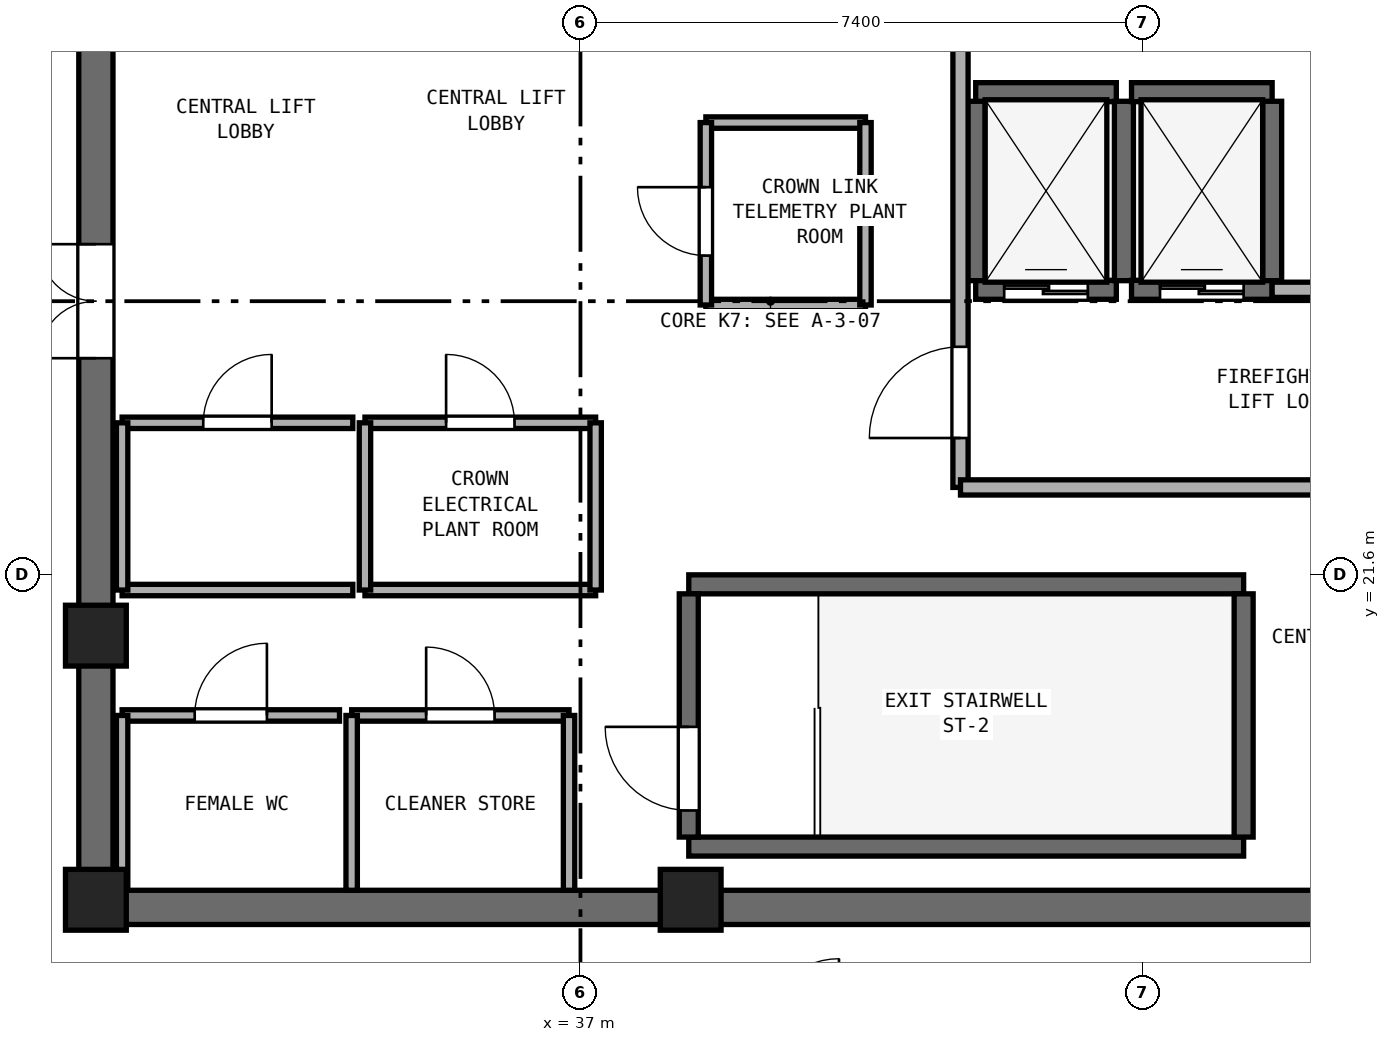
"""IFC4 building model, lengths in metres.
Left out: names, types, materials, properties, quantities, classifications, styles, units other than length and angle.
Written with IfcOpenShell. Run it as: python <this file> out.ifc"""

import sys

from ifc_helpers import new_model, si_unit, direction, frame, frame_2d, origin, origin_2d, place, context, subcontext, project, spatial, rectangle, extrude, element, fill, save


model = new_model("IFC4")
c1 = context("Model", 3, precision=1e-05, world=origin(), true_north=direction((0.0, 1.0)))
c2 = subcontext(c1, "Body", "Model", "MODEL_VIEW")
j1 = project(units=[si_unit("LENGTHUNIT", "METRE"), si_unit("PLANEANGLEUNIT", "RADIAN")], contexts=[c1])
p1 = place(None, origin())
s1 = spatial("IfcSite", under=j1, at=p1, CompositionType="ELEMENT")
p2 = place(p1, origin())
s2 = spatial("IfcBuilding", under=s1, at=p2, CompositionType="ELEMENT")
p3 = place(p2, frame((0.0, 0.0, 333.4)))
s3 = spatial("IfcBuildingStorey", under=s2, at=p3, CompositionType="ELEMENT", Elevation=333.4)
p4 = place(p3, frame((30.4, 17.225, 0.0), z_axis=(0.0, 0.0, 1.0), x_axis=(1.0, 0.0, 0.0)))
e1 = element("IfcWall", 1, at=p4, inside=s3, PredefinedType="SHEAR", context=c2, shape_type="SweptSolid", body=[
    extrude(rectangle(XDim=18.2, YDim=0.45, at=frame_2d((9.1, 0.0))), origin(), (0.0, 0.0, 1.0), 3.7),
])
p5 = place(p3, frame((30.625, 17.45, 0.0), z_axis=(0.0, 0.0, 1.0), x_axis=(0.0, 1.0, 0.0)))
e2 = element("IfcWall", 2, at=p5, inside=s3, PredefinedType="SHEAR", context=c2, shape_type="SweptSolid", body=[
    extrude(rectangle(XDim=15.5, YDim=0.45, at=frame_2d((7.75, 0.0))), origin(), (0.0, 0.0, 1.0), 3.7),
])
p6 = place(p5, frame((7.0, 0.0, 0.0)))
e3 = element("IfcOpeningElement", 3, at=p6, cuts=e2, PredefinedType="OPENING", context=c2, shape_type="SweptSolid", body=[
    extrude(rectangle(XDim=1.5, YDim=2.15, at=frame_2d((0.75, 1.075))), frame((0.0, 0.235, 0.0), z_axis=(0.0, -1.0, 0.0), x_axis=(1.0, 0.0, 0.0)), (0.0, 0.0, 1.0), 0.47),
])
for number, where, z_axis, x_axis in (
    (4, (30.625, 17.325, 0.0), (0.0, 0.0, 1.0), (1.0, 0.0, 0.0)),
    (5, (38.45, 17.325, 0.0), (0.0, 0.0, 1.0), (1.0, 0.0, 0.0)),
    (6, (30.625, 20.8, 0.0), (0.0, 0.0, 1.0), (1.0, 0.0, 0.0)),
):
    element("IfcColumn", number, at=place(p3, frame(where, z_axis=z_axis, x_axis=x_axis)), inside=s3, PredefinedType="PILASTER", context=c2, shape_type="SweptSolid", body=[
        extrude(rectangle(XDim=0.8, YDim=0.8, at=origin_2d()), origin(), (0.0, 0.0, 1.0), 4.0),
    ])
for number, where, z_axis, x_axis in (
    (7, (38.425, 18.025, 0.0), (0.0, 0.0, 1.0), (1.0, 0.0, 0.0)),
    (8, (38.425, 21.475, 0.0), (0.0, 0.0, 1.0), (1.0, 0.0, 0.0)),
):
    element("IfcWall", number, at=place(p3, frame(where, z_axis=z_axis, x_axis=x_axis)), inside=s3, PredefinedType="SHEAR", context=c2, shape_type="SweptSolid", body=[
        extrude(rectangle(XDim=7.3, YDim=0.25, at=frame_2d((3.65, 0.0))), origin(), (0.0, 0.0, 1.0), 3.7),
    ])
p7 = place(p3, frame((38.425, 18.15, 0.0), z_axis=(0.0, 0.0, 1.0), x_axis=(0.0, 1.0, 0.0)))
e9 = element("IfcWall", 9, at=p7, inside=s3, PredefinedType="SHEAR", context=c2, shape_type="SweptSolid", body=[
    extrude(rectangle(XDim=3.2, YDim=0.25, at=frame_2d((1.6, 0.0))), origin(), (0.0, 0.0, 1.0), 3.7),
])
p8 = place(p7, frame((0.35, 0.0, 0.0)))
e10 = element("IfcOpeningElement", 10, at=p8, cuts=e9, PredefinedType="OPENING", context=c2, shape_type="SweptSolid", body=[
    extrude(rectangle(XDim=1.1, YDim=2.15, at=frame_2d((0.55, 1.075))), frame((0.0, 0.135, 0.0), z_axis=(0.0, -1.0, 0.0), x_axis=(1.0, 0.0, 0.0)), (0.0, 0.0, 1.0), 0.27),
])
p9 = place(p3, frame((45.725, 18.15, 0.0), z_axis=(0.0, 0.0, 1.0), x_axis=(0.0, 1.0, 0.0)))
e11 = element("IfcWall", 11, at=p9, inside=s3, PredefinedType="SHEAR", context=c2, shape_type="SweptSolid", body=[
    extrude(rectangle(XDim=3.2, YDim=0.25, at=frame_2d((1.6, 0.0))), origin(), (0.0, 0.0, 1.0), 3.7),
])
p10 = place(p3, frame((42.2, 25.35, 0.0), z_axis=(0.0, 0.0, 1.0), x_axis=(1.0, 0.0, 0.0)))
e12 = element("IfcWall", 12, at=p10, inside=s3, PredefinedType="SHEAR", context=c2, shape_type="SweptSolid", body=[
    extrude(rectangle(XDim=1.85, YDim=0.25, at=frame_2d((0.925, 0.0))), origin(), (0.0, 0.0, 1.0), 3.7),
])
p11 = place(p10, frame((0.375, 0.0, 0.0)))
e13 = element("IfcOpeningElement", 13, at=p11, cuts=e12, PredefinedType="OPENING", context=c2, shape_type="SweptSolid", body=[
    extrude(rectangle(XDim=1.1, YDim=2.15, at=frame_2d((0.55, 1.075))), frame((0.0, 0.135, 0.0), z_axis=(0.0, -1.0, 0.0), x_axis=(1.0, 0.0, 0.0)), (0.0, 0.0, 1.0), 0.27),
])
p12 = place(p3, frame((42.2, 27.95, 0.0), z_axis=(0.0, 0.0, 1.0), x_axis=(1.0, 0.0, 0.0)))
e14 = element("IfcWall", 14, at=p12, inside=s3, PredefinedType="SHEAR", context=c2, shape_type="SweptSolid", body=[
    extrude(rectangle(XDim=1.85, YDim=0.25, at=frame_2d((0.925, 0.0))), origin(), (0.0, 0.0, 1.0), 3.7),
])
for number, where, z_axis, x_axis in (
    (15, (42.2, 25.47, 0.0), (0.0, 0.0, 1.0), (0.0, 1.0, 0.0)),
    (16, (44.15, 25.47, 0.0), (0.0, 0.0, 1.0), (0.0, 1.0, 0.0)),
):
    element("IfcWall", number, at=place(p3, frame(where, z_axis=z_axis, x_axis=x_axis)), inside=s3, PredefinedType="SHEAR", context=c2, shape_type="SweptSolid", body=[
        extrude(rectangle(XDim=2.36, YDim=0.25, at=frame_2d((1.18, 0.0))), origin(), (0.0, 0.0, 1.0), 3.7),
    ])
p13 = place(p3, frame((44.25, 25.35, 0.0), z_axis=(0.0, 0.0, 1.0), x_axis=(1.0, 0.0, 0.0)))
e17 = element("IfcWall", 17, at=p13, inside=s3, PredefinedType="SHEAR", context=c2, shape_type="SweptSolid", body=[
    extrude(rectangle(XDim=1.85, YDim=0.25, at=frame_2d((0.925, 0.0))), origin(), (0.0, 0.0, 1.0), 3.7),
])
p14 = place(p13, frame((0.375, 0.0, 0.0)))
e18 = element("IfcOpeningElement", 18, at=p14, cuts=e17, PredefinedType="OPENING", context=c2, shape_type="SweptSolid", body=[
    extrude(rectangle(XDim=1.1, YDim=2.15, at=frame_2d((0.55, 1.075))), frame((0.0, 0.135, 0.0), z_axis=(0.0, -1.0, 0.0), x_axis=(1.0, 0.0, 0.0)), (0.0, 0.0, 1.0), 0.27),
])
p15 = place(p3, frame((44.25, 27.95, 0.0), z_axis=(0.0, 0.0, 1.0), x_axis=(1.0, 0.0, 0.0)))
e19 = element("IfcWall", 19, at=p15, inside=s3, PredefinedType="SHEAR", context=c2, shape_type="SweptSolid", body=[
    extrude(rectangle(XDim=1.85, YDim=0.25, at=frame_2d((0.925, 0.0))), origin(), (0.0, 0.0, 1.0), 3.7),
])
p16 = place(p3, frame((46.1, 25.47, 0.0), z_axis=(0.0, 0.0, 1.0), x_axis=(0.0, 1.0, 0.0)))
e20 = element("IfcWall", 20, at=p16, inside=s3, PredefinedType="SHEAR", context=c2, shape_type="SweptSolid", body=[
    extrude(rectangle(XDim=2.36, YDim=0.25, at=frame_2d((1.18, 0.0))), origin(), (0.0, 0.0, 1.0), 3.7),
])
p17 = place(p3, frame((42.0, 22.75, 0.0), z_axis=(0.0, 0.0, 1.0), x_axis=(0.0, 1.0, 0.0)))
e21 = element("IfcWall", 21, at=p17, inside=s3, PredefinedType="SOLIDWALL", context=c2, shape_type="SweptSolid", body=[
    extrude(rectangle(XDim=6.05, YDim=0.2, at=frame_2d((3.025, 0.0))), origin(), (0.0, 0.0, 1.0), 3.7),
])
p18 = place(p17, frame((0.65, 0.0, 0.0)))
e22 = element("IfcOpeningElement", 22, at=p18, cuts=e21, PredefinedType="OPENING", context=c2, shape_type="SweptSolid", body=[
    extrude(rectangle(XDim=1.2, YDim=2.15, at=frame_2d((0.6, 1.075))), frame((0.0, 0.11, 0.0), z_axis=(0.0, -1.0, 0.0), x_axis=(1.0, 0.0, 0.0)), (0.0, 0.0, 1.0), 0.22),
])
p19 = place(p3, frame((42.0, 22.75, 0.0), z_axis=(0.0, 0.0, 1.0), x_axis=(1.0, 0.0, 0.0)))
e23 = element("IfcWall", 23, at=p19, inside=s3, PredefinedType="SOLIDWALL", context=c2, shape_type="SweptSolid", body=[
    extrude(rectangle(XDim=6.15, YDim=0.2, at=frame_2d((3.075, 0.0))), origin(), (0.0, 0.0, 1.0), 3.7),
])
p20 = place(p3, frame((46.1, 25.35, 0.0), z_axis=(0.0, 0.0, 1.0), x_axis=(1.0, 0.0, 0.0)))
e24 = element("IfcWall", 24, at=p20, inside=s3, PredefinedType="SOLIDWALL", context=c2, shape_type="SweptSolid", body=[
    extrude(rectangle(XDim=2.05, YDim=0.2, at=frame_2d((1.025, 0.0))), origin(), (0.0, 0.0, 1.0), 3.7),
])
p21 = place(p3, frame((30.97, 19.75, 0.0), z_axis=(0.0, 0.0, 1.0), x_axis=(1.0, 0.0, 0.0)))
e25 = element("IfcWall", 25, at=p21, inside=s3, PredefinedType="PARTITIONING", context=c2, shape_type="SweptSolid", body=[
    extrude(rectangle(XDim=2.86, YDim=0.15, at=frame_2d((1.43, 0.0))), origin(), (0.0, 0.0, 1.0), 3.7),
])
p22 = place(p21, frame((0.955, 0.0, 0.0)))
e26 = element("IfcOpeningElement", 26, at=p22, cuts=e25, PredefinedType="OPENING", context=c2, shape_type="SweptSolid", body=[
    extrude(rectangle(XDim=0.95, YDim=2.1, at=frame_2d((0.475, 1.05))), frame((0.0, 0.085, 0.0), z_axis=(0.0, -1.0, 0.0), x_axis=(1.0, 0.0, 0.0)), (0.0, 0.0, 1.0), 0.17),
])
p23 = place(p3, frame((30.97, 17.45, 0.0), z_axis=(0.0, 0.0, 1.0), x_axis=(0.0, 1.0, 0.0)))
e27 = element("IfcWall", 27, at=p23, inside=s3, PredefinedType="PARTITIONING", context=c2, shape_type="SweptSolid", body=[
    extrude(rectangle(XDim=2.3, YDim=0.15, at=frame_2d((1.15, 0.0))), origin(), (0.0, 0.0, 1.0), 2.8),
])
p24 = place(p3, frame((33.99, 19.75, 0.0), z_axis=(0.0, 0.0, 1.0), x_axis=(1.0, 0.0, 0.0)))
e28 = element("IfcWall", 28, at=p24, inside=s3, PredefinedType="PARTITIONING", context=c2, shape_type="SweptSolid", body=[
    extrude(rectangle(XDim=2.86, YDim=0.15, at=frame_2d((1.43, 0.0))), origin(), (0.0, 0.0, 1.0), 3.7),
])
p25 = place(p24, frame((0.98, 0.0, 0.0)))
e29 = element("IfcOpeningElement", 29, at=p25, cuts=e28, PredefinedType="OPENING", context=c2, shape_type="SweptSolid", body=[
    extrude(rectangle(XDim=0.9, YDim=2.1, at=frame_2d((0.45, 1.05))), frame((0.0, 0.085, 0.0), z_axis=(0.0, -1.0, 0.0), x_axis=(1.0, 0.0, 0.0)), (0.0, 0.0, 1.0), 0.17),
])
for number, where, z_axis, x_axis in (
    (30, (33.99, 17.45, 0.0), (0.0, 0.0, 1.0), (0.0, 1.0, 0.0)),
    (31, (36.85, 17.45, 0.0), (0.0, 0.0, 1.0), (0.0, 1.0, 0.0)),
):
    element("IfcWall", number, at=place(p3, frame(where, z_axis=z_axis, x_axis=x_axis)), inside=s3, PredefinedType="PARTITIONING", context=c2, shape_type="SweptSolid", body=[
        extrude(rectangle(XDim=2.3, YDim=0.15, at=frame_2d((1.15, 0.0))), origin(), (0.0, 0.0, 1.0), 3.7),
    ])
p26 = place(p3, frame((30.97, 21.4, 0.0), z_axis=(0.0, 0.0, 1.0), x_axis=(1.0, 0.0, 0.0)))
e32 = element("IfcWall", 32, at=p26, inside=s3, PredefinedType="PARTITIONING", context=c2, shape_type="SweptSolid", body=[
    extrude(rectangle(XDim=3.035, YDim=0.15, at=frame_2d((1.518, 0.0))), origin(), (0.0, 0.0, 1.0), 3.7),
])
p27 = place(p3, frame((30.97, 23.6, 0.0), z_axis=(0.0, 0.0, 1.0), x_axis=(1.0, 0.0, 0.0)))
e33 = element("IfcWall", 33, at=p27, inside=s3, PredefinedType="PARTITIONING", context=c2, shape_type="SweptSolid", body=[
    extrude(rectangle(XDim=3.035, YDim=0.15, at=frame_2d((1.518, 0.0))), origin(), (0.0, 0.0, 1.0), 3.7),
])
p28 = place(p27, frame((1.067, 0.0, 0.0)))
e34 = element("IfcOpeningElement", 34, at=p28, cuts=e33, PredefinedType="OPENING", context=c2, shape_type="SweptSolid", body=[
    extrude(rectangle(XDim=0.9, YDim=2.1, at=frame_2d((0.45, 1.05))), frame((0.0, 0.085, 0.0), z_axis=(0.0, -1.0, 0.0), x_axis=(1.0, 0.0, 0.0)), (0.0, 0.0, 1.0), 0.17),
])
p29 = place(p3, frame((30.97, 21.4, 0.0), z_axis=(0.0, 0.0, 1.0), x_axis=(0.0, 1.0, 0.0)))
e35 = element("IfcWall", 35, at=p29, inside=s3, PredefinedType="PARTITIONING", context=c2, shape_type="SweptSolid", body=[
    extrude(rectangle(XDim=2.2, YDim=0.15, at=frame_2d((1.1, 0.0))), origin(), (0.0, 0.0, 1.0), 2.8),
])
p30 = place(p3, frame((34.165, 21.4, 0.0), z_axis=(0.0, 0.0, 1.0), x_axis=(1.0, 0.0, 0.0)))
e36 = element("IfcWall", 36, at=p30, inside=s3, PredefinedType="PARTITIONING", context=c2, shape_type="SweptSolid", body=[
    extrude(rectangle(XDim=3.035, YDim=0.15, at=frame_2d((1.518, 0.0))), origin(), (0.0, 0.0, 1.0), 3.7),
])
p31 = place(p3, frame((34.165, 23.6, 0.0), z_axis=(0.0, 0.0, 1.0), x_axis=(1.0, 0.0, 0.0)))
e37 = element("IfcWall", 37, at=p31, inside=s3, PredefinedType="PARTITIONING", context=c2, shape_type="SweptSolid", body=[
    extrude(rectangle(XDim=3.035, YDim=0.15, at=frame_2d((1.518, 0.0))), origin(), (0.0, 0.0, 1.0), 3.7),
])
p32 = place(p31, frame((1.067, 0.0, 0.0)))
e38 = element("IfcOpeningElement", 38, at=p32, cuts=e37, PredefinedType="OPENING", context=c2, shape_type="SweptSolid", body=[
    extrude(rectangle(XDim=0.9, YDim=2.1, at=frame_2d((0.45, 1.05))), frame((0.0, 0.085, 0.0), z_axis=(0.0, -1.0, 0.0), x_axis=(1.0, 0.0, 0.0)), (0.0, 0.0, 1.0), 0.17),
])
for number, where, z_axis, x_axis in (
    (39, (34.165, 21.4, 0.0), (0.0, 0.0, 1.0), (0.0, 1.0, 0.0)),
    (40, (37.2, 21.4, 0.0), (0.0, 0.0, 1.0), (0.0, 1.0, 0.0)),
):
    element("IfcWall", number, at=place(p3, frame(where, z_axis=z_axis, x_axis=x_axis)), inside=s3, PredefinedType="PARTITIONING", context=c2, shape_type="SweptSolid", body=[
        extrude(rectangle(XDim=2.2, YDim=0.15, at=frame_2d((1.1, 0.0))), origin(), (0.0, 0.0, 1.0), 3.7),
    ])
for number, where, z_axis, x_axis in (
    (41, (38.65, 25.15, 0.0), (0.0, 0.0, 1.0), (1.0, 0.0, 0.0)),
    (42, (38.65, 27.55, 0.0), (0.0, 0.0, 1.0), (1.0, 0.0, 0.0)),
):
    element("IfcWall", number, at=place(p3, frame(where, z_axis=z_axis, x_axis=x_axis)), inside=s3, PredefinedType="PARTITIONING", context=c2, shape_type="SweptSolid", body=[
        extrude(rectangle(XDim=2.1, YDim=0.15, at=frame_2d((1.05, 0.0))), origin(), (0.0, 0.0, 1.0), 3.7),
    ])
p33 = place(p3, frame((38.65, 25.15, 0.0), z_axis=(0.0, 0.0, 1.0), x_axis=(0.0, 1.0, 0.0)))
e43 = element("IfcWall", 43, at=p33, inside=s3, PredefinedType="PARTITIONING", context=c2, shape_type="SweptSolid", body=[
    extrude(rectangle(XDim=2.4, YDim=0.15, at=frame_2d((1.2, 0.0))), origin(), (0.0, 0.0, 1.0), 3.7),
])
p34 = place(p33, frame((0.65, 0.0, 0.0)))
e44 = element("IfcOpeningElement", 44, at=p34, cuts=e43, PredefinedType="OPENING", context=c2, shape_type="SweptSolid", body=[
    extrude(rectangle(XDim=0.9, YDim=2.1, at=frame_2d((0.45, 1.05))), frame((0.0, 0.085, 0.0), z_axis=(0.0, -1.0, 0.0), x_axis=(1.0, 0.0, 0.0)), (0.0, 0.0, 1.0), 0.17),
])
p35 = place(p3, frame((40.75, 25.15, 0.0), z_axis=(0.0, 0.0, 1.0), x_axis=(0.0, 1.0, 0.0)))
e45 = element("IfcWall", 45, at=p35, inside=s3, PredefinedType="PARTITIONING", context=c2, shape_type="SweptSolid", body=[
    extrude(rectangle(XDim=2.4, YDim=0.15, at=frame_2d((1.2, 0.0))), origin(), (0.0, 0.0, 1.0), 3.7),
])
p36 = place(p3, frame((27.114, 17.109, 0.0), z_axis=(0.0, 0.0, 1.0), x_axis=(0.751684867815, -0.659522448062, 0.0)))
e46 = element("IfcWall", 46, at=p36, inside=s3, PredefinedType="STANDARD", context=c2, shape_type="SweptSolid", body=[
    extrude(rectangle(XDim=8.723, YDim=0.28, at=frame_2d((4.362, 0.0))), origin(), (0.0, 0.0, 1.0), 3.7),
])
p37 = place(p36, frame((3.562, 0.0, 0.9)))
e47 = element("IfcOpeningElement", 47, at=p37, cuts=e46, PredefinedType="OPENING", context=c2, shape_type="SweptSolid", body=[
    extrude(rectangle(XDim=1.6, YDim=1.45, at=frame_2d((0.8, 0.725))), frame((0.0, 0.15, 0.0), z_axis=(0.0, -1.0, 0.0), x_axis=(1.0, 0.0, 0.0)), (0.0, 0.0, 1.0), 0.3),
])
p38 = place(p36, frame((6.136, 0.0, 0.9)))
e48 = element("IfcOpeningElement", 48, at=p38, cuts=e46, PredefinedType="OPENING", context=c2, shape_type="SweptSolid", body=[
    extrude(rectangle(XDim=1.6, YDim=1.45, at=frame_2d((0.8, 0.725))), frame((0.0, 0.15, 0.0), z_axis=(0.0, -1.0, 0.0), x_axis=(1.0, 0.0, 0.0)), (0.0, 0.0, 1.0), 0.3),
])
p39 = place(p8, origin())
e49 = element("IfcDoor", 49, at=p39, inside=s3, OperationType="SINGLE_SWING_RIGHT", PredefinedType="DOOR", context=c2, shape_type="SweptSolid", body=[
    extrude(rectangle(XDim=1.1, YDim=2.15, at=frame_2d((0.55, 1.075))), frame((0.0, 0.025, 0.0), z_axis=(0.0, -1.0, 0.0), x_axis=(1.0, 0.0, 0.0)), (0.0, 0.0, 1.0), 0.05),
])
fill(e10, e49)
p40 = place(p11, origin())
e50 = element("IfcDoor", 50, at=p40, inside=s3, OperationType="DOUBLE_DOOR_SLIDING", PredefinedType="DOOR", context=c2, shape_type="SweptSolid", body=[
    extrude(rectangle(XDim=1.1, YDim=2.15, at=frame_2d((0.55, 1.075))), frame((0.0, 0.025, 0.0), z_axis=(0.0, -1.0, 0.0), x_axis=(1.0, 0.0, 0.0)), (0.0, 0.0, 1.0), 0.05),
])
fill(e13, e50)
p41 = place(p14, origin())
e51 = element("IfcDoor", 51, at=p41, inside=s3, OperationType="DOUBLE_DOOR_SLIDING", PredefinedType="DOOR", context=c2, shape_type="SweptSolid", body=[
    extrude(rectangle(XDim=1.1, YDim=2.15, at=frame_2d((0.55, 1.075))), frame((0.0, 0.025, 0.0), z_axis=(0.0, -1.0, 0.0), x_axis=(1.0, 0.0, 0.0)), (0.0, 0.0, 1.0), 0.05),
])
fill(e18, e51)
p42 = place(p18, origin())
e52 = element("IfcDoor", 52, at=p42, inside=s3, OperationType="SINGLE_SWING_LEFT", PredefinedType="DOOR", context=c2, shape_type="SweptSolid", body=[
    extrude(rectangle(XDim=1.2, YDim=2.15, at=frame_2d((0.6, 1.075))), frame((0.0, 0.025, 0.0), z_axis=(0.0, -1.0, 0.0), x_axis=(1.0, 0.0, 0.0)), (0.0, 0.0, 1.0), 0.05),
])
fill(e22, e52)
p43 = place(p6, origin())
e53 = element("IfcDoor", 53, at=p43, inside=s3, OperationType="DOUBLE_DOOR_SINGLE_SWING", PredefinedType="DOOR", context=c2, shape_type="SweptSolid", body=[
    extrude(rectangle(XDim=1.5, YDim=2.15, at=frame_2d((0.75, 1.075))), frame((0.0, 0.025, 0.0), z_axis=(0.0, -1.0, 0.0), x_axis=(1.0, 0.0, 0.0)), (0.0, 0.0, 1.0), 0.05),
])
fill(e3, e53)
p44 = place(p22, origin())
e54 = element("IfcDoor", 54, at=p44, inside=s3, OperationType="SINGLE_SWING_RIGHT", PredefinedType="DOOR", context=c2, shape_type="SweptSolid", body=[
    extrude(rectangle(XDim=0.95, YDim=2.1, at=frame_2d((0.475, 1.05))), frame((0.0, 0.025, 0.0), z_axis=(0.0, -1.0, 0.0), x_axis=(1.0, 0.0, 0.0)), (0.0, 0.0, 1.0), 0.05),
])
fill(e26, e54)
p45 = place(p25, origin())
e55 = element("IfcDoor", 55, at=p45, inside=s3, OperationType="SINGLE_SWING_LEFT", PredefinedType="DOOR", context=c2, shape_type="SweptSolid", body=[
    extrude(rectangle(XDim=0.9, YDim=2.1, at=frame_2d((0.45, 1.05))), frame((0.0, 0.025, 0.0), z_axis=(0.0, -1.0, 0.0), x_axis=(1.0, 0.0, 0.0)), (0.0, 0.0, 1.0), 0.05),
])
fill(e29, e55)
p46 = place(p28, origin())
e56 = element("IfcDoor", 56, at=p46, inside=s3, OperationType="SINGLE_SWING_RIGHT", PredefinedType="DOOR", context=c2, shape_type="SweptSolid", body=[
    extrude(rectangle(XDim=0.9, YDim=2.1, at=frame_2d((0.45, 1.05))), frame((0.0, 0.025, 0.0), z_axis=(0.0, -1.0, 0.0), x_axis=(1.0, 0.0, 0.0)), (0.0, 0.0, 1.0), 0.05),
])
fill(e34, e56)
p47 = place(p32, origin())
e57 = element("IfcDoor", 57, at=p47, inside=s3, OperationType="SINGLE_SWING_LEFT", PredefinedType="DOOR", context=c2, shape_type="SweptSolid", body=[
    extrude(rectangle(XDim=0.9, YDim=2.1, at=frame_2d((0.45, 1.05))), frame((0.0, 0.025, 0.0), z_axis=(0.0, -1.0, 0.0), x_axis=(1.0, 0.0, 0.0)), (0.0, 0.0, 1.0), 0.05),
])
fill(e38, e57)
p48 = place(p34, origin())
e58 = element("IfcDoor", 58, at=p48, inside=s3, OperationType="SINGLE_SWING_RIGHT", PredefinedType="DOOR", context=c2, shape_type="SweptSolid", body=[
    extrude(rectangle(XDim=0.9, YDim=2.1, at=frame_2d((0.45, 1.05))), frame((0.0, 0.025, 0.0), z_axis=(0.0, -1.0, 0.0), x_axis=(1.0, 0.0, 0.0)), (0.0, 0.0, 1.0), 0.05),
])
fill(e44, e58)
save(model, sys.argv[1])
